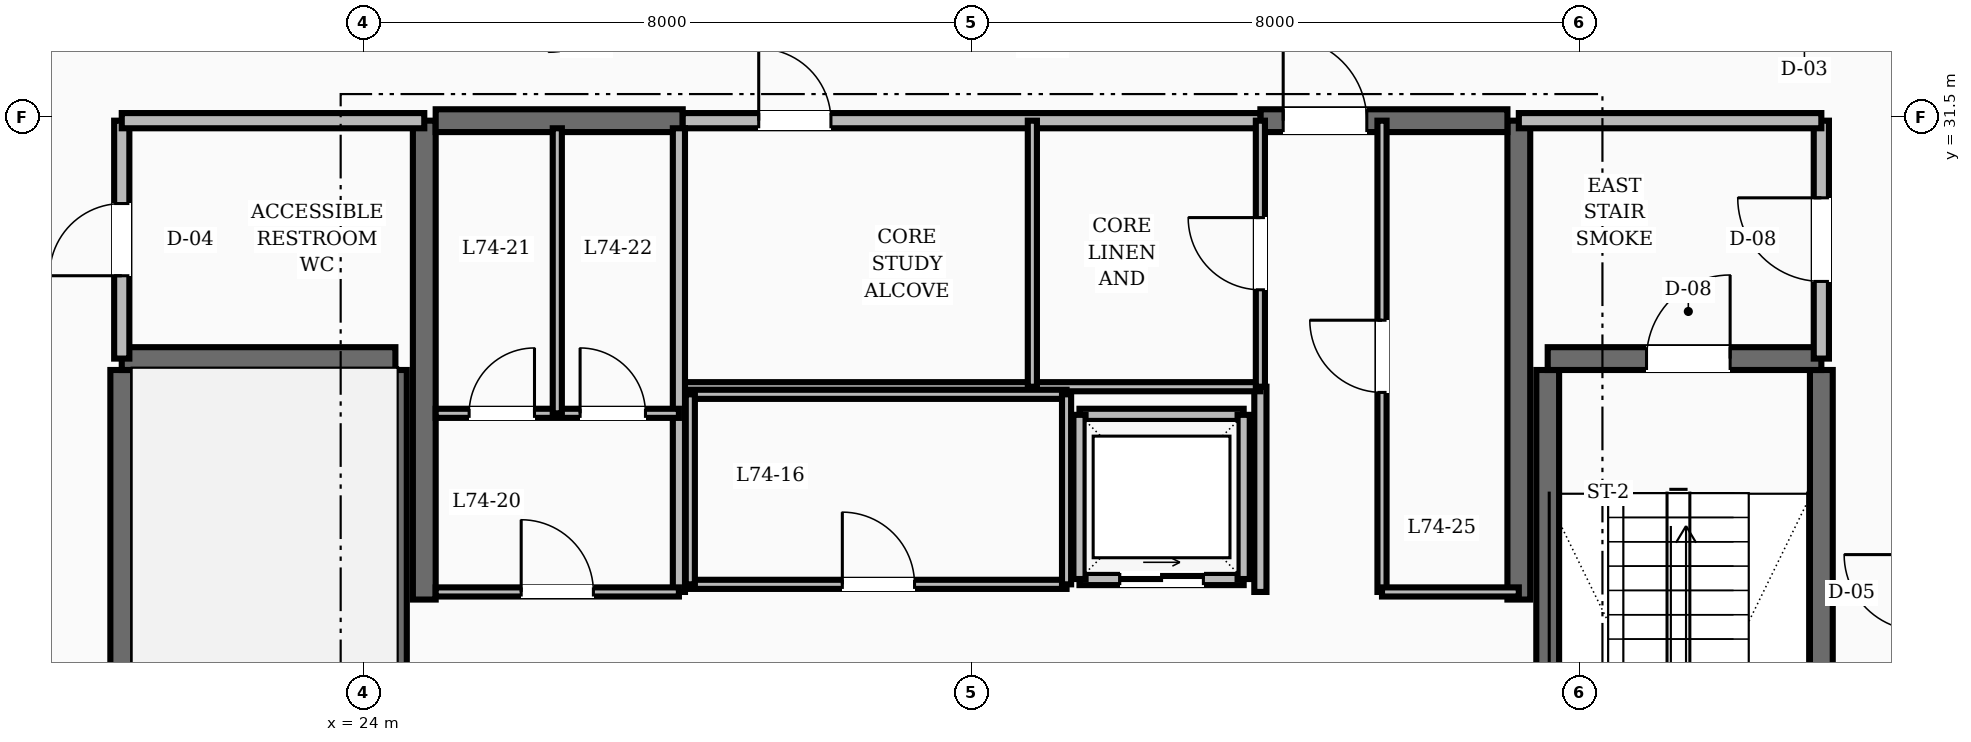
"""IFC4 building model, lengths in metres.
Left out: names, types, materials, properties, quantities, classifications, styles, units other than length and angle.
Written with IfcOpenShell. Run it as: python <this file> out.ifc"""

import sys

from ifc_helpers import new_model, si_unit, direction, frame, frame_2d, origin, place, context, subcontext, project, spatial, rectangle, extrude, element, fill, save


model = new_model("IFC4")
c1 = context("Model", 3, precision=1e-05, world=origin(), true_north=direction((0.0, 1.0)))
c2 = subcontext(c1, "Body", "Model", "MODEL_VIEW")
j1 = project(units=[si_unit("LENGTHUNIT", "METRE"), si_unit("PLANEANGLEUNIT", "RADIAN")], contexts=[c1])
p1 = place(None, origin())
s1 = spatial("IfcSite", under=j1, at=p1, CompositionType="ELEMENT")
p2 = place(p1, origin())
s2 = spatial("IfcBuilding", under=s1, at=p2, CompositionType="ELEMENT")
p3 = place(p2, frame((0.0, 0.0, 283.2)))
s3 = spatial("IfcBuildingStorey", under=s2, at=p3, CompositionType="ELEMENT", Elevation=283.2)
for number, where, z_axis, x_axis in (
    (1, (24.8, 25.15, 0.0), (0.0, 0.0, 1.0), (0.0, 1.0, 0.0)),
    (2, (39.2, 25.15, 0.0), (0.0, 0.0, 1.0), (0.0, 1.0, 0.0)),
):
    element("IfcWall", number, at=place(p3, frame(where, z_axis=z_axis, x_axis=x_axis)), inside=s3, PredefinedType="SHEAR", context=c2, shape_type="SweptSolid", body=[
        extrude(rectangle(XDim=6.3, YDim=0.3, at=frame_2d((3.15, 0.0))), origin(), (0.0, 0.0, 1.0), 3.6),
    ])
p4 = place(p3, frame((24.95, 31.45, 0.0), z_axis=(0.0, 0.0, 1.0), x_axis=(1.0, 0.0, 0.0)))
e3 = element("IfcWall", 3, at=p4, inside=s3, PredefinedType="SHEAR", context=c2, shape_type="SweptSolid", body=[
    extrude(rectangle(XDim=3.25, YDim=0.3, at=frame_2d((1.625, 0.0))), origin(), (0.0, 0.0, 1.0), 3.6),
])
p5 = place(p3, frame((35.8, 31.45, 0.0), z_axis=(0.0, 0.0, 1.0), x_axis=(1.0, 0.0, 0.0)))
e4 = element("IfcWall", 4, at=p5, inside=s3, PredefinedType="SHEAR", context=c2, shape_type="SweptSolid", body=[
    extrude(rectangle(XDim=3.25, YDim=0.3, at=frame_2d((1.625, 0.0))), origin(), (0.0, 0.0, 1.0), 3.6),
])
p6 = place(p5, frame((0.3, 0.0, 0.0)))
e5 = element("IfcOpeningElement", 5, at=p6, cuts=e4, PredefinedType="OPENING", context=c2, shape_type="SweptSolid", body=[
    extrude(rectangle(XDim=1.1, YDim=2.1, at=frame_2d((0.55, 1.05))), frame((0.0, 0.16, 0.0), z_axis=(0.0, -1.0, 0.0), x_axis=(1.0, 0.0, 0.0)), (0.0, 0.0, 1.0), 0.32),
])
for number, where, z_axis, x_axis in (
    (6, (20.82, 19.43, 0.0), (0.0, 0.0, 1.0), (0.0, 1.0, 0.0)),
    (7, (24.42, 19.43, 0.0), (0.0, 0.0, 1.0), (0.0, 1.0, 0.0)),
):
    element("IfcWall", number, at=place(p3, frame(where, z_axis=z_axis, x_axis=x_axis)), inside=s3, PredefinedType="SHEAR", context=c2, shape_type="SweptSolid", body=[
        extrude(rectangle(XDim=8.74, YDim=0.3, at=frame_2d((4.37, 0.0))), origin(), (0.0, 0.0, 1.0), 3.6),
    ])
p7 = place(p3, frame((20.82, 28.32, 0.0), z_axis=(0.0, 0.0, 1.0), x_axis=(1.0, 0.0, 0.0)))
e8 = element("IfcWall", 8, at=p7, inside=s3, PredefinedType="SHEAR", context=c2, shape_type="SweptSolid", body=[
    extrude(rectangle(XDim=3.6, YDim=0.3, at=frame_2d((1.8, 0.0))), origin(), (0.0, 0.0, 1.0), 3.6),
])
for number, where, z_axis, x_axis in (
    (9, (43.18, 19.43, 0.0), (0.0, 0.0, 1.0), (0.0, 1.0, 0.0)),
    (10, (39.58, 19.43, 0.0), (0.0, 0.0, 1.0), (0.0, 1.0, 0.0)),
):
    element("IfcWall", number, at=place(p3, frame(where, z_axis=z_axis, x_axis=x_axis)), inside=s3, PredefinedType="SHEAR", context=c2, shape_type="SweptSolid", body=[
        extrude(rectangle(XDim=8.74, YDim=0.3, at=frame_2d((4.37, 0.0))), origin(), (0.0, 0.0, 1.0), 3.6),
    ])
p8 = place(p3, frame((39.58, 28.32, 0.0), z_axis=(0.0, 0.0, 1.0), x_axis=(1.0, 0.0, 0.0)))
e11 = element("IfcWall", 11, at=p8, inside=s3, PredefinedType="SHEAR", context=c2, shape_type="SweptSolid", body=[
    extrude(rectangle(XDim=3.6, YDim=0.3, at=frame_2d((1.8, 0.0))), origin(), (0.0, 0.0, 1.0), 3.6),
])
p9 = place(p8, frame((1.3, 0.0, 0.0)))
e12 = element("IfcOpeningElement", 12, at=p9, cuts=e11, PredefinedType="OPENING", context=c2, shape_type="SweptSolid", body=[
    extrude(rectangle(XDim=1.1, YDim=2.1, at=frame_2d((0.55, 1.05))), frame((0.0, 0.16, 0.0), z_axis=(0.0, -1.0, 0.0), x_axis=(1.0, 0.0, 0.0)), (0.0, 0.0, 1.0), 0.32),
])
p10 = place(p3, frame((43.18, 28.32, 0.0), z_axis=(0.0, 0.0, 1.0), x_axis=(0.0, 1.0, 0.0)))
e13 = element("IfcWall", 13, at=p10, inside=s3, PredefinedType="SOLIDWALL", context=c2, shape_type="SweptSolid", body=[
    extrude(rectangle(XDim=3.13, YDim=0.2, at=frame_2d((1.565, 0.0))), origin(), (0.0, 0.0, 1.0), 2.87),
])
p11 = place(p10, frame((1.015, 0.0, 0.0)))
e14 = element("IfcOpeningElement", 14, at=p11, cuts=e13, PredefinedType="OPENING", context=c2, shape_type="SweptSolid", body=[
    extrude(rectangle(XDim=1.1, YDim=2.1, at=frame_2d((0.55, 1.05))), frame((0.0, 0.11, 0.0), z_axis=(0.0, -1.0, 0.0), x_axis=(1.0, 0.0, 0.0)), (0.0, 0.0, 1.0), 0.22),
])
p12 = place(p3, frame((39.2, 31.45, 0.0), z_axis=(0.0, 0.0, 1.0), x_axis=(1.0, 0.0, 0.0)))
e15 = element("IfcWall", 15, at=p12, inside=s3, PredefinedType="SOLIDWALL", context=c2, shape_type="SweptSolid", body=[
    extrude(rectangle(XDim=3.98, YDim=0.2, at=frame_2d((1.99, 0.0))), origin(), (0.0, 0.0, 1.0), 2.87),
])
p13 = place(p3, frame((20.82, 28.32, 0.0), z_axis=(0.0, 0.0, 1.0), x_axis=(0.0, 1.0, 0.0)))
e16 = element("IfcWall", 16, at=p13, inside=s3, PredefinedType="SOLIDWALL", context=c2, shape_type="SweptSolid", body=[
    extrude(rectangle(XDim=3.13, YDim=0.2, at=frame_2d((1.565, 0.0))), origin(), (0.0, 0.0, 1.0), 2.87),
])
p14 = place(p13, frame((1.09, 0.0, 0.0)))
e17 = element("IfcOpeningElement", 17, at=p14, cuts=e16, PredefinedType="OPENING", context=c2, shape_type="SweptSolid", body=[
    extrude(rectangle(XDim=0.95, YDim=2.1, at=frame_2d((0.475, 1.05))), frame((0.0, 0.11, 0.0), z_axis=(0.0, -1.0, 0.0), x_axis=(1.0, 0.0, 0.0)), (0.0, 0.0, 1.0), 0.22),
])
p15 = place(p3, frame((20.82, 31.45, 0.0), z_axis=(0.0, 0.0, 1.0), x_axis=(1.0, 0.0, 0.0)))
e18 = element("IfcWall", 18, at=p15, inside=s3, PredefinedType="SOLIDWALL", context=c2, shape_type="SweptSolid", body=[
    extrude(rectangle(XDim=3.98, YDim=0.2, at=frame_2d((1.99, 0.0))), origin(), (0.0, 0.0, 1.0), 2.87),
])
p16 = place(p3, frame((35.8, 25.25, 0.0), z_axis=(0.0, 0.0, 1.0), x_axis=(0.0, 1.0, 0.0)))
e19 = element("IfcWall", 19, at=p16, inside=s3, PredefinedType="SOLIDWALL", context=c2, shape_type="SweptSolid", body=[
    extrude(rectangle(XDim=2.7, YDim=0.16, at=frame_2d((1.35, 0.0))), origin(), (0.0, 0.0, 1.0), 2.87),
])
p17 = place(p3, frame((33.42, 25.42, 0.0), z_axis=(0.0, 0.0, 1.0), x_axis=(1.0, 0.0, 0.0)))
e20 = element("IfcWall", 20, at=p17, inside=s3, PredefinedType="SOLIDWALL", context=c2, shape_type="SweptSolid", body=[
    extrude(rectangle(XDim=2.16, YDim=0.16, at=frame_2d((1.08, 0.0))), origin(), (0.0, 0.0, 1.0), 2.87),
])
p18 = place(p17, frame((0.53, 0.0, 0.0)))
e21 = element("IfcOpeningElement", 21, at=p18, cuts=e20, PredefinedType="OPENING", context=c2, shape_type="SweptSolid", body=[
    extrude(rectangle(XDim=1.1, YDim=2.15, at=frame_2d((0.55, 1.075))), frame((0.0, 0.09, 0.0), z_axis=(0.0, -1.0, 0.0), x_axis=(1.0, 0.0, 0.0)), (0.0, 0.0, 1.0), 0.18),
])
for number, where, z_axis, x_axis in (
    (22, (33.42, 27.58, 0.0), (0.0, 0.0, 1.0), (1.0, 0.0, 0.0)),
    (23, (33.42, 25.42, 0.0), (0.0, 0.0, 1.0), (0.0, 1.0, 0.0)),
    (24, (35.58, 25.42, 0.0), (0.0, 0.0, 1.0), (0.0, 1.0, 0.0)),
):
    element("IfcWall", number, at=place(p3, frame(where, z_axis=z_axis, x_axis=x_axis)), inside=s3, PredefinedType="SOLIDWALL", context=c2, shape_type="SweptSolid", body=[
        extrude(rectangle(XDim=2.16, YDim=0.16, at=frame_2d((1.08, 0.0))), origin(), (0.0, 0.0, 1.0), 2.87),
    ])
p19 = place(p3, frame((28.2, 31.45, 0.0), z_axis=(0.0, 0.0, 1.0), x_axis=(1.0, 0.0, 0.0)))
e25 = element("IfcWall", 25, at=p19, inside=s3, PredefinedType="SOLIDWALL", context=c2, shape_type="SweptSolid", body=[
    extrude(rectangle(XDim=7.6, YDim=0.2, at=frame_2d((3.8, 0.0))), origin(), (0.0, 0.0, 1.0), 2.87),
])
p20 = place(p19, frame((1.0, 0.0, 0.0)))
e26 = element("IfcOpeningElement", 26, at=p20, cuts=e25, PredefinedType="OPENING", context=c2, shape_type="SweptSolid", body=[
    extrude(rectangle(XDim=0.95, YDim=2.1, at=frame_2d((0.475, 1.05))), frame((0.0, 0.11, 0.0), z_axis=(0.0, -1.0, 0.0), x_axis=(1.0, 0.0, 0.0)), (0.0, 0.0, 1.0), 0.22),
])
p21 = place(p3, frame((28.2, 27.95, 0.0), z_axis=(0.0, 0.0, 1.0), x_axis=(1.0, 0.0, 0.0)))
e27 = element("IfcWall", 27, at=p21, inside=s3, PredefinedType="PARTITIONING", context=c2, shape_type="SweptSolid", body=[
    extrude(rectangle(XDim=7.6, YDim=0.12, at=frame_2d((3.8, 0.0))), origin(), (0.0, 0.0, 1.0), 2.87),
])
p22 = place(p3, frame((35.8, 27.95, 0.0), z_axis=(0.0, 0.0, 1.0), x_axis=(0.0, 1.0, 0.0)))
e28 = element("IfcWall", 28, at=p22, inside=s3, PredefinedType="PARTITIONING", context=c2, shape_type="SweptSolid", body=[
    extrude(rectangle(XDim=3.5, YDim=0.12, at=frame_2d((1.75, 0.0))), origin(), (0.0, 0.0, 1.0), 2.87),
])
p23 = place(p22, frame((1.275, 0.0, 0.0)))
e29 = element("IfcOpeningElement", 29, at=p23, cuts=e28, PredefinedType="OPENING", context=c2, shape_type="SweptSolid", body=[
    extrude(rectangle(XDim=0.95, YDim=2.1, at=frame_2d((0.475, 1.05))), frame((0.0, 0.07, 0.0), z_axis=(0.0, -1.0, 0.0), x_axis=(1.0, 0.0, 0.0)), (0.0, 0.0, 1.0), 0.14),
])
p24 = place(p3, frame((32.8, 27.95, 0.0), z_axis=(0.0, 0.0, 1.0), x_axis=(0.0, 1.0, 0.0)))
e30 = element("IfcWall", 30, at=p24, inside=s3, PredefinedType="PARTITIONING", context=c2, shape_type="SweptSolid", body=[
    extrude(rectangle(XDim=3.5, YDim=0.12, at=frame_2d((1.75, 0.0))), origin(), (0.0, 0.0, 1.0), 2.87),
])
p25 = place(p3, frame((28.3, 25.35, 0.0), z_axis=(0.0, 0.0, 1.0), x_axis=(1.0, 0.0, 0.0)))
e31 = element("IfcWall", 31, at=p25, inside=s3, PredefinedType="PARTITIONING", context=c2, shape_type="SweptSolid", body=[
    extrude(rectangle(XDim=4.95, YDim=0.12, at=frame_2d((2.475, 0.0))), origin(), (0.0, 0.0, 1.0), 2.87),
])
p26 = place(p25, frame((2.0, 0.0, 0.0)))
e32 = element("IfcOpeningElement", 32, at=p26, cuts=e31, PredefinedType="OPENING", context=c2, shape_type="SweptSolid", body=[
    extrude(rectangle(XDim=0.95, YDim=2.1, at=frame_2d((0.475, 1.05))), frame((0.0, 0.07, 0.0), z_axis=(0.0, -1.0, 0.0), x_axis=(1.0, 0.0, 0.0)), (0.0, 0.0, 1.0), 0.14),
])
p27 = place(p3, frame((28.3, 27.85, 0.0), z_axis=(0.0, 0.0, 1.0), x_axis=(1.0, 0.0, 0.0)))
e33 = element("IfcWall", 33, at=p27, inside=s3, PredefinedType="PARTITIONING", context=c2, shape_type="SweptSolid", body=[
    extrude(rectangle(XDim=4.95, YDim=0.12, at=frame_2d((2.475, 0.0))), origin(), (0.0, 0.0, 1.0), 2.87),
])
for number, where, z_axis, x_axis in (
    (34, (28.3, 25.35, 0.0), (0.0, 0.0, 1.0), (0.0, 1.0, 0.0)),
    (35, (33.25, 25.35, 0.0), (0.0, 0.0, 1.0), (0.0, 1.0, 0.0)),
):
    element("IfcWall", number, at=place(p3, frame(where, z_axis=z_axis, x_axis=x_axis)), inside=s3, PredefinedType="PARTITIONING", context=c2, shape_type="SweptSolid", body=[
        extrude(rectangle(XDim=2.5, YDim=0.12, at=frame_2d((1.25, 0.0))), origin(), (0.0, 0.0, 1.0), 2.87),
    ])
p28 = place(p3, frame((28.15, 25.25, 0.0), z_axis=(0.0, 0.0, 1.0), x_axis=(0.0, 1.0, 0.0)))
e36 = element("IfcWall", 36, at=p28, inside=s3, PredefinedType="SOLIDWALL", context=c2, shape_type="SweptSolid", body=[
    extrude(rectangle(XDim=6.1, YDim=0.16, at=frame_2d((3.05, 0.0))), origin(), (0.0, 0.0, 1.0), 2.87),
])
p29 = place(p3, frame((24.95, 25.25, 0.0), z_axis=(0.0, 0.0, 1.0), x_axis=(1.0, 0.0, 0.0)))
e37 = element("IfcWall", 37, at=p29, inside=s3, PredefinedType="PARTITIONING", context=c2, shape_type="SweptSolid", body=[
    extrude(rectangle(XDim=3.2, YDim=0.12, at=frame_2d((1.6, 0.0))), origin(), (0.0, 0.0, 1.0), 2.87),
])
p30 = place(p29, frame((1.125, 0.0, 0.0)))
e38 = element("IfcOpeningElement", 38, at=p30, cuts=e37, PredefinedType="OPENING", context=c2, shape_type="SweptSolid", body=[
    extrude(rectangle(XDim=0.95, YDim=2.1, at=frame_2d((0.475, 1.05))), frame((0.0, 0.07, 0.0), z_axis=(0.0, -1.0, 0.0), x_axis=(1.0, 0.0, 0.0)), (0.0, 0.0, 1.0), 0.14),
])
p31 = place(p3, frame((37.4, 25.25, 0.0), z_axis=(0.0, 0.0, 1.0), x_axis=(0.0, 1.0, 0.0)))
e39 = element("IfcWall", 39, at=p31, inside=s3, PredefinedType="PARTITIONING", context=c2, shape_type="SweptSolid", body=[
    extrude(rectangle(XDim=6.2, YDim=0.12, at=frame_2d((3.1, 0.0))), origin(), (0.0, 0.0, 1.0), 2.87),
])
p32 = place(p31, frame((2.625, 0.0, 0.0)))
e40 = element("IfcOpeningElement", 40, at=p32, cuts=e39, PredefinedType="OPENING", context=c2, shape_type="SweptSolid", body=[
    extrude(rectangle(XDim=0.95, YDim=2.1, at=frame_2d((0.475, 1.05))), frame((0.0, 0.07, 0.0), z_axis=(0.0, -1.0, 0.0), x_axis=(1.0, 0.0, 0.0)), (0.0, 0.0, 1.0), 0.14),
])
p33 = place(p3, frame((37.4, 25.25, 0.0), z_axis=(0.0, 0.0, 1.0), x_axis=(1.0, 0.0, 0.0)))
e41 = element("IfcWall", 41, at=p33, inside=s3, PredefinedType="PARTITIONING", context=c2, shape_type="SweptSolid", body=[
    extrude(rectangle(XDim=1.8, YDim=0.12, at=frame_2d((0.9, 0.0))), origin(), (0.0, 0.0, 1.0), 2.87),
])
p34 = place(p3, frame((24.95, 27.6, 0.0), z_axis=(0.0, 0.0, 1.0), x_axis=(1.0, 0.0, 0.0)))
e42 = element("IfcWall", 42, at=p34, inside=s3, PredefinedType="PARTITIONING", context=c2, shape_type="SweptSolid", body=[
    extrude(rectangle(XDim=3.2, YDim=0.12, at=frame_2d((1.6, 0.0))), origin(), (0.0, 0.0, 1.0), 2.87),
])
p35 = place(p34, frame((0.44, 0.0, 0.0)))
e43 = element("IfcOpeningElement", 43, at=p35, cuts=e42, PredefinedType="OPENING", context=c2, shape_type="SweptSolid", body=[
    extrude(rectangle(XDim=0.86, YDim=2.1, at=frame_2d((0.43, 1.05))), frame((0.0, 0.07, 0.0), z_axis=(0.0, -1.0, 0.0), x_axis=(1.0, 0.0, 0.0)), (0.0, 0.0, 1.0), 0.14),
])
p36 = place(p34, frame((1.9, 0.0, 0.0)))
e44 = element("IfcOpeningElement", 44, at=p36, cuts=e42, PredefinedType="OPENING", context=c2, shape_type="SweptSolid", body=[
    extrude(rectangle(XDim=0.86, YDim=2.1, at=frame_2d((0.43, 1.05))), frame((0.0, 0.07, 0.0), z_axis=(0.0, -1.0, 0.0), x_axis=(1.0, 0.0, 0.0)), (0.0, 0.0, 1.0), 0.14),
])
p37 = place(p3, frame((26.55, 27.6, 0.0), z_axis=(0.0, 0.0, 1.0), x_axis=(0.0, 1.0, 0.0)))
e45 = element("IfcWall", 45, at=p37, inside=s3, PredefinedType="PARTITIONING", context=c2, shape_type="SweptSolid", body=[
    extrude(rectangle(XDim=3.75, YDim=0.12, at=frame_2d((1.875, 0.0))), origin(), (0.0, 0.0, 1.0), 2.87),
])
p38 = place(p3, frame((44.427, 32.303, 0.0), z_axis=(0.0, 0.0, 1.0), x_axis=(-0.707106781187, 0.707106781187, 0.0)))
e46 = element("IfcWall", 46, at=p38, inside=s3, PredefinedType="SOLIDWALL", context=c2, shape_type="SweptSolid", body=[
    extrude(rectangle(XDim=2.916, YDim=0.16, at=frame_2d((1.458, 0.0))), origin(), (0.0, 0.0, 1.0), 2.87),
])
p39 = place(p38, frame((0.983, 0.0, 0.0)))
e47 = element("IfcOpeningElement", 47, at=p39, cuts=e46, PredefinedType="OPENING", context=c2, shape_type="SweptSolid", body=[
    extrude(rectangle(XDim=0.95, YDim=2.1, at=frame_2d((0.475, 1.05))), frame((0.0, 0.09, 0.0), z_axis=(0.0, -1.0, 0.0), x_axis=(1.0, 0.0, 0.0)), (0.0, 0.0, 1.0), 0.18),
])
p40 = place(p3, frame((21.635, 34.365, 0.0), z_axis=(0.0, 0.0, 1.0), x_axis=(-0.707106781187, -0.707106781187, 0.0)))
e48 = element("IfcWall", 48, at=p40, inside=s3, PredefinedType="SOLIDWALL", context=c2, shape_type="SweptSolid", body=[
    extrude(rectangle(XDim=2.916, YDim=0.16, at=frame_2d((1.458, 0.0))), origin(), (0.0, 0.0, 1.0), 2.87),
])
p41 = place(p9, origin())
e49 = element("IfcDoor", 49, at=p41, inside=s3, OperationType="SINGLE_SWING_RIGHT", PredefinedType="DOOR", context=c2, shape_type="SweptSolid", body=[
    extrude(rectangle(XDim=1.1, YDim=2.1, at=frame_2d((0.55, 1.05))), frame((0.0, 0.025, 0.0), z_axis=(0.0, -1.0, 0.0), x_axis=(1.0, 0.0, 0.0)), (0.0, 0.0, 1.0), 0.05),
])
fill(e12, e49)
p42 = place(p11, origin())
e50 = element("IfcDoor", 50, at=p42, inside=s3, OperationType="SINGLE_SWING_RIGHT", PredefinedType="DOOR", context=c2, shape_type="SweptSolid", body=[
    extrude(rectangle(XDim=1.1, YDim=2.1, at=frame_2d((0.55, 1.05))), frame((0.0, 0.025, 0.0), z_axis=(0.0, -1.0, 0.0), x_axis=(1.0, 0.0, 0.0)), (0.0, 0.0, 1.0), 0.05),
])
fill(e14, e50)
p43 = place(p14, origin())
e51 = element("IfcDoor", 51, at=p43, inside=s3, OperationType="SINGLE_SWING_LEFT", PredefinedType="DOOR", context=c2, shape_type="SweptSolid", body=[
    extrude(rectangle(XDim=0.95, YDim=2.1, at=frame_2d((0.475, 1.05))), frame((0.0, 0.025, 0.0), z_axis=(0.0, -1.0, 0.0), x_axis=(1.0, 0.0, 0.0)), (0.0, 0.0, 1.0), 0.05),
])
fill(e17, e51)
p44 = place(p6, origin())
e52 = element("IfcDoor", 52, at=p44, inside=s3, OperationType="SINGLE_SWING_LEFT", PredefinedType="DOOR", context=c2, shape_type="SweptSolid", body=[
    extrude(rectangle(XDim=1.1, YDim=2.1, at=frame_2d((0.55, 1.05))), frame((0.0, 0.025, 0.0), z_axis=(0.0, -1.0, 0.0), x_axis=(1.0, 0.0, 0.0)), (0.0, 0.0, 1.0), 0.05),
])
fill(e5, e52)
p45 = place(p18, origin())
e53 = element("IfcDoor", 53, at=p45, inside=s3, OperationType="SLIDING_TO_RIGHT", PredefinedType="DOOR", context=c2, shape_type="SweptSolid", body=[
    extrude(rectangle(XDim=1.1, YDim=2.15, at=frame_2d((0.55, 1.075))), frame((0.0, 0.025, 0.0), z_axis=(0.0, -1.0, 0.0), x_axis=(1.0, 0.0, 0.0)), (0.0, 0.0, 1.0), 0.05),
])
fill(e21, e53)
p46 = place(p20, origin())
e54 = element("IfcDoor", 54, at=p46, inside=s3, OperationType="SINGLE_SWING_LEFT", PredefinedType="DOOR", context=c2, shape_type="SweptSolid", body=[
    extrude(rectangle(XDim=0.95, YDim=2.1, at=frame_2d((0.475, 1.05))), frame((0.0, 0.025, 0.0), z_axis=(0.0, -1.0, 0.0), x_axis=(1.0, 0.0, 0.0)), (0.0, 0.0, 1.0), 0.05),
])
fill(e26, e54)
p47 = place(p23, origin())
e55 = element("IfcDoor", 55, at=p47, inside=s3, OperationType="SINGLE_SWING_RIGHT", PredefinedType="DOOR", context=c2, shape_type="SweptSolid", body=[
    extrude(rectangle(XDim=0.95, YDim=2.1, at=frame_2d((0.475, 1.05))), frame((0.0, 0.025, 0.0), z_axis=(0.0, -1.0, 0.0), x_axis=(1.0, 0.0, 0.0)), (0.0, 0.0, 1.0), 0.05),
])
fill(e29, e55)
p48 = place(p26, origin())
e56 = element("IfcDoor", 56, at=p48, inside=s3, OperationType="SINGLE_SWING_LEFT", PredefinedType="DOOR", context=c2, shape_type="SweptSolid", body=[
    extrude(rectangle(XDim=0.95, YDim=2.1, at=frame_2d((0.475, 1.05))), frame((0.0, 0.025, 0.0), z_axis=(0.0, -1.0, 0.0), x_axis=(1.0, 0.0, 0.0)), (0.0, 0.0, 1.0), 0.05),
])
fill(e32, e56)
p49 = place(p30, origin())
e57 = element("IfcDoor", 57, at=p49, inside=s3, OperationType="SINGLE_SWING_LEFT", PredefinedType="DOOR", context=c2, shape_type="SweptSolid", body=[
    extrude(rectangle(XDim=0.95, YDim=2.1, at=frame_2d((0.475, 1.05))), frame((0.0, 0.025, 0.0), z_axis=(0.0, -1.0, 0.0), x_axis=(1.0, 0.0, 0.0)), (0.0, 0.0, 1.0), 0.05),
])
fill(e38, e57)
p50 = place(p35, origin())
e58 = element("IfcDoor", 58, at=p50, inside=s3, OperationType="SINGLE_SWING_RIGHT", PredefinedType="DOOR", context=c2, shape_type="SweptSolid", body=[
    extrude(rectangle(XDim=0.86, YDim=2.1, at=frame_2d((0.43, 1.05))), frame((0.0, 0.025, 0.0), z_axis=(0.0, -1.0, 0.0), x_axis=(1.0, 0.0, 0.0)), (0.0, 0.0, 1.0), 0.05),
])
fill(e43, e58)
p51 = place(p36, origin())
e59 = element("IfcDoor", 59, at=p51, inside=s3, OperationType="SINGLE_SWING_LEFT", PredefinedType="DOOR", context=c2, shape_type="SweptSolid", body=[
    extrude(rectangle(XDim=0.86, YDim=2.1, at=frame_2d((0.43, 1.05))), frame((0.0, 0.025, 0.0), z_axis=(0.0, -1.0, 0.0), x_axis=(1.0, 0.0, 0.0)), (0.0, 0.0, 1.0), 0.05),
])
fill(e44, e59)
p52 = place(p32, origin())
e60 = element("IfcDoor", 60, at=p52, inside=s3, OperationType="SINGLE_SWING_RIGHT", PredefinedType="DOOR", context=c2, shape_type="SweptSolid", body=[
    extrude(rectangle(XDim=0.95, YDim=2.1, at=frame_2d((0.475, 1.05))), frame((0.0, 0.025, 0.0), z_axis=(0.0, -1.0, 0.0), x_axis=(1.0, 0.0, 0.0)), (0.0, 0.0, 1.0), 0.05),
])
fill(e40, e60)
save(model, sys.argv[1])
